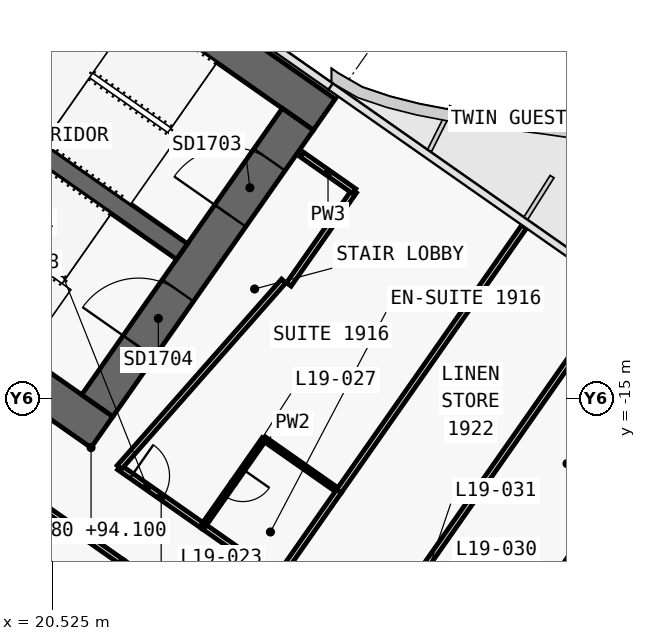
"""IFC4 building model, lengths in metres.
Left out: names, types, materials, properties, quantities, classifications, styles, units other than length and angle.
Written with IfcOpenShell. Run it as: python <this file> out.ifc"""

import sys

from ifc_helpers import new_model, si_unit, direction, frame, frame_2d, origin, place, context, subcontext, project, spatial, polyline, rectangle, outline, extrude, element, fill, save


model = new_model("IFC4")
c1 = context("Model", 3, precision=1e-05, world=origin(), true_north=direction((0.0, 1.0)))
c2 = subcontext(c1, "Body", "Model", "MODEL_VIEW")
j1 = project(units=[si_unit("LENGTHUNIT", "METRE"), si_unit("PLANEANGLEUNIT", "RADIAN")], contexts=[c1])
p1 = place(None, origin())
s1 = spatial("IfcSite", under=j1, at=p1, CompositionType="ELEMENT")
p2 = place(p1, origin())
s2 = spatial("IfcBuilding", under=s1, at=p2, CompositionType="ELEMENT")
p3 = place(p2, frame((0.0, 0.0, 94.1)))
s3 = spatial("IfcBuildingStorey", under=s2, at=p3, CompositionType="ELEMENT", Elevation=94.1)
p4 = place(p3, frame((-0.037, 11.867, 0.0), z_axis=(0.0, 0.0, 1.0), x_axis=(0.819155306259, -0.573571777746, 0.0)))
e1 = element("IfcWall", 1, at=p4, inside=s3, PredefinedType="SHEAR", context=c2, shape_type="SweptSolid", body=[
    extrude(outline(polyline([(33.837, 0.5), (0.0, 0.5), (0.7, -0.5), (33.837, -0.5), (33.837, 0.5)])), origin(), (0.0, 0.0, 1.0), 3.6),
])
p5 = place(p3, frame((-0.037, -0.585, 0.0), z_axis=(0.0, 0.0, 1.0), x_axis=(0.819157152511, -0.573569140985, 0.0)))
e2 = element("IfcWall", 2, at=p5, inside=s3, PredefinedType="SHEAR", context=c2, shape_type="SweptSolid", body=[
    extrude(outline(polyline([(26.695, 0.5), (0.0, 0.5), (0.7, -0.5), (26.695, -0.5), (26.695, 0.5)])), origin(), (0.0, 0.0, 1.0), 3.6),
])
p6 = place(p5, frame((6.695, 0.0, 0.0)))
e3 = element("IfcOpeningElement", 3, at=p6, cuts=e2, PredefinedType="OPENING", context=c2, shape_type="SweptSolid", body=[
    extrude(rectangle(XDim=1.5, YDim=2.1, at=frame_2d((0.75, 1.05))), frame((0.0, 0.51, 0.0), z_axis=(0.0, -1.0, 0.0), x_axis=(1.0, 0.0, 0.0)), (0.0, 0.0, 1.0), 1.02),
])
p7 = place(p5, frame((12.445, 0.0, 0.0)))
e4 = element("IfcOpeningElement", 4, at=p7, cuts=e2, PredefinedType="OPENING", context=c2, shape_type="SweptSolid", body=[
    extrude(rectangle(XDim=1.5, YDim=2.1, at=frame_2d((0.75, 1.05))), frame((0.0, 0.51, 0.0), z_axis=(0.0, -1.0, 0.0), x_axis=(1.0, 0.0, 0.0)), (0.0, 0.0, 1.0), 1.02),
])
p8 = place(p3, frame((21.708, -15.2, 0.0), z_axis=(0.0, 0.0, 1.0), x_axis=(0.573576324356, 0.819152122709, 0.0)))
e5 = element("IfcWall", 5, at=p8, inside=s3, PredefinedType="SHEAR", context=c2, shape_type="SweptSolid", body=[
    extrude(outline(polyline([(9.2, 0.5), (0.0, 0.5), (0.0, -0.5), (9.2, -0.5), (9.2, 0.5)])), origin(), (0.0, 0.0, 1.0), 3.6),
])
p9 = place(p8, frame((6.1, 0.0, 0.0)))
e6 = element("IfcOpeningElement", 6, at=p9, cuts=e5, PredefinedType="OPENING", context=c2, shape_type="SweptSolid", body=[
    extrude(rectangle(XDim=1.8, YDim=2.1, at=frame_2d((0.9, 1.05))), frame((0.0, 0.51, 0.0), z_axis=(0.0, -1.0, 0.0), x_axis=(1.0, 0.0, 0.0)), (0.0, 0.0, 1.0), 1.02),
])
p10 = place(p8, frame((1.9, 0.0, 0.0)))
e7 = element("IfcOpeningElement", 7, at=p10, cuts=e5, PredefinedType="OPENING", context=c2, shape_type="SweptSolid", body=[
    extrude(rectangle(XDim=1.8, YDim=2.1, at=frame_2d((0.9, 1.05))), frame((0.0, 0.51, 0.0), z_axis=(0.0, -1.0, 0.0), x_axis=(1.0, 0.0, 0.0)), (0.0, 0.0, 1.0), 1.02),
])
p11 = place(p3, frame((2.638, 3.768, 0.0), z_axis=(0.0, 0.0, 1.0), x_axis=(0.819148977158, -0.573580816643, 0.0)))
e8 = element("IfcWall", 8, at=p11, inside=s3, PredefinedType="SHEAR", context=c2, shape_type="SweptSolid", body=[
    extrude(outline(polyline([(0.0, 0.25), (0.0, -0.25), (26.0, -0.25), (26.0, 0.25), (0.0, 0.25)])), origin(), (0.0, 0.0, 1.0), 3.6),
])
p12 = place(p11, frame((9.637, 0.0, 0.0)))
e9 = element("IfcOpeningElement", 9, at=p12, cuts=e8, PredefinedType="OPENING", context=c2, shape_type="SweptSolid", body=[
    extrude(rectangle(XDim=1.2, YDim=2.1, at=frame_2d((0.6, 1.05))), frame((0.0, 0.26, 0.0), z_axis=(0.0, -1.0, 0.0), x_axis=(1.0, 0.0, 0.0)), (0.0, 0.0, 1.0), 0.52),
])
p13 = place(p11, frame((11.812, 0.0, 0.0)))
e10 = element("IfcOpeningElement", 10, at=p13, cuts=e8, PredefinedType="OPENING", context=c2, shape_type="SweptSolid", body=[
    extrude(rectangle(XDim=1.2, YDim=2.1, at=frame_2d((0.6, 1.05))), frame((0.0, 0.26, 0.0), z_axis=(0.0, -1.0, 0.0), x_axis=(1.0, 0.0, 0.0)), (0.0, 0.0, 1.0), 0.52),
])
p14 = place(p11, frame((13.988, 0.0, 0.0)))
e11 = element("IfcOpeningElement", 11, at=p14, cuts=e8, PredefinedType="OPENING", context=c2, shape_type="SweptSolid", body=[
    extrude(rectangle(XDim=1.2, YDim=2.1, at=frame_2d((0.6, 1.05))), frame((0.0, 0.26, 0.0), z_axis=(0.0, -1.0, 0.0), x_axis=(1.0, 0.0, 0.0)), (0.0, 0.0, 1.0), 0.52),
])
p15 = place(p11, frame((16.262, 0.0, 0.0)))
e12 = element("IfcOpeningElement", 12, at=p15, cuts=e8, PredefinedType="OPENING", context=c2, shape_type="SweptSolid", body=[
    extrude(rectangle(XDim=1.0, YDim=2.1, at=frame_2d((0.5, 1.05))), frame((0.0, 0.26, 0.0), z_axis=(0.0, -1.0, 0.0), x_axis=(1.0, 0.0, 0.0)), (0.0, 0.0, 1.0), 0.52),
])
p16 = place(p3, frame((22.284, -16.824, 0.0), z_axis=(0.0, 0.0, 1.0), x_axis=(0.819176640776, -0.573541307325, 0.0)))
e13 = element("IfcWall", 13, at=p16, inside=s3, PredefinedType="PARTITIONING", context=c2, shape_type="SweptSolid", body=[
    extrude(rectangle(XDim=2.698, YDim=0.15, at=frame_2d((1.349, 0.0))), origin(), (0.0, 0.0, 1.0), 3.32),
])
p17 = place(p16, frame((0.396, 0.0, 0.0)))
e14 = element("IfcOpeningElement", 14, at=p17, cuts=e13, PredefinedType="OPENING", context=c2, shape_type="SweptSolid", body=[
    extrude(rectangle(XDim=1.0, YDim=2.1, at=frame_2d((0.5, 1.05))), frame((0.0, 0.085, 0.0), z_axis=(0.0, -1.0, 0.0), x_axis=(1.0, 0.0, 0.0)), (0.0, 0.0, 1.0), 0.17),
])
p18 = place(p3, frame((24.491, -18.369, 0.0), z_axis=(0.0, 0.0, 1.0), x_axis=(0.819179439794, -0.573537309527, 0.0)))
e15 = element("IfcWall", 15, at=p18, inside=s3, PredefinedType="PARTITIONING", context=c2, shape_type="SweptSolid", body=[
    extrude(rectangle(XDim=2.404, YDim=0.15, at=frame_2d((1.202, 0.0))), origin(), (0.0, 0.0, 1.0), 3.32),
])
p19 = place(p3, frame((25.313, -21.387, 0.0), z_axis=(0.0, 0.0, 1.0), x_axis=(-0.819145961204, 0.573585123798, 0.0)))
e16 = element("IfcWall", 16, at=p19, inside=s3, PredefinedType="PARTITIONING", context=c2, shape_type="SweptSolid", body=[
    extrude(rectangle(XDim=3.603, YDim=0.15, at=frame_2d((1.802, 0.0))), origin(), (0.0, 0.0, 1.0), 3.32),
])
p20 = place(p19, frame((1.302, 0.0, 0.0)))
e17 = element("IfcOpeningElement", 17, at=p20, cuts=e16, PredefinedType="OPENING", context=c2, shape_type="SweptSolid", body=[
    extrude(rectangle(XDim=1.0, YDim=2.1, at=frame_2d((0.5, 1.05))), frame((0.0, 0.085, 0.0), z_axis=(0.0, -1.0, 0.0), x_axis=(1.0, 0.0, 0.0)), (0.0, 0.0, 1.0), 0.17),
])
p21 = place(p3, frame((22.364, -19.322, 0.0), z_axis=(0.0, 0.0, 1.0), x_axis=(-0.819146032251, 0.573585022335, 0.0)))
e18 = element("IfcWall", 18, at=p21, inside=s3, PredefinedType="PARTITIONING", context=c2, shape_type="SweptSolid", body=[
    extrude(rectangle(XDim=2.404, YDim=0.15, at=frame_2d((1.202, 0.0))), origin(), (0.0, 0.0, 1.0), 2.6),
])
p22 = place(p3, frame((26.098, -16.076, 0.0), z_axis=(0.0, 0.0, 1.0), x_axis=(-0.573550118428, -0.819170471667, 0.0)))
e19 = element("IfcWall", 19, at=p22, inside=s3, PredefinedType="PARTITIONING", context=c2, shape_type="SweptSolid", body=[
    extrude(rectangle(XDim=2.8, YDim=0.12, at=frame_2d((1.4, 0.0))), origin(), (0.0, 0.0, 1.0), 2.6),
])
p23 = place(p22, frame((0.975, 0.0, 0.0)))
e20 = element("IfcOpeningElement", 20, at=p23, cuts=e19, PredefinedType="OPENING", context=c2, shape_type="SweptSolid", body=[
    extrude(rectangle(XDim=0.85, YDim=2.05, at=frame_2d((0.425, 1.025))), frame((0.0, 0.07, 0.0), z_axis=(0.0, -1.0, 0.0), x_axis=(1.0, 0.0, 0.0)), (0.0, 0.0, 1.0), 0.14),
])
p24 = place(p3, frame((28.065, -17.453, 0.0), z_axis=(0.0, 0.0, 1.0), x_axis=(-0.819155442668, 0.573571582932, 0.0)))
e21 = element("IfcWall", 21, at=p24, inside=s3, PredefinedType="PARTITIONING", context=c2, shape_type="SweptSolid", body=[
    extrude(rectangle(XDim=2.4, YDim=0.12, at=frame_2d((1.2, 0.0))), origin(), (0.0, 0.0, 1.0), 3.32),
])
p25 = place(p3, frame((32.94, -10.491, 0.0), z_axis=(0.0, 0.0, 1.0), x_axis=(-0.573593433868, -0.819140142237, 0.0)))
e22 = element("IfcWall", 22, at=p25, inside=s3, PredefinedType="PARTITIONING", context=c2, shape_type="SweptSolid", body=[
    extrude(rectangle(XDim=8.499, YDim=0.15, at=frame_2d((4.25, 0.0))), origin(), (0.0, 0.0, 1.0), 2.6),
])
p26 = place(p3, frame((22.285, -16.825, 0.0), z_axis=(0.0, 0.0, 1.0), x_axis=(0.661551268245, 0.749899939647, 0.0)))
e23 = element("IfcWall", 23, at=p26, inside=s3, PredefinedType="PARTITIONING", context=c2, shape_type="SweptSolid", body=[
    extrude(rectangle(XDim=6.541, YDim=0.15, at=frame_2d((3.271, 0.0))), origin(), (0.0, 0.0, 1.0), 2.6),
])
p27 = place(p3, frame((26.746, -12.014, 0.0), z_axis=(0.0, 0.0, 1.0), x_axis=(0.573560650686, 0.819163097304, 0.0)))
e24 = element("IfcWall", 24, at=p27, inside=s3, PredefinedType="PARTITIONING", context=c2, shape_type="SweptSolid", body=[
    extrude(rectangle(XDim=3.0, YDim=0.15, at=frame_2d((1.5, 0.0))), origin(), (0.0, 0.0, 1.0), 3.32),
])
p28 = place(p3, frame((28.467, -9.556, 0.0), z_axis=(0.0, 0.0, 1.0), x_axis=(-0.819109000826, 0.573637903879, 0.0)))
e25 = element("IfcWall", 25, at=p28, inside=s3, PredefinedType="PARTITIONING", context=c2, shape_type="SweptSolid", body=[
    extrude(rectangle(XDim=1.68, YDim=0.15, at=frame_2d((0.84, 0.0))), origin(), (0.0, 0.0, 1.0), 3.32),
])
p29 = place(p3, frame((28.064, -17.454, 0.0), z_axis=(0.0, 0.0, 1.0), x_axis=(-0.573550118428, -0.819170471667, 0.0)))
e26 = element("IfcWall", 26, at=p29, inside=s3, PredefinedType="PARTITIONING", context=c2, shape_type="SweptSolid", body=[
    extrude(rectangle(XDim=2.8, YDim=0.15, at=frame_2d((1.4, 0.0))), origin(), (0.0, 0.0, 1.0), 2.6),
])
p30 = place(p3, frame((35.013, -12.76, 0.0), z_axis=(0.0, 0.0, 1.0), x_axis=(-0.573558725113, -0.819164445546, 0.0)))
e27 = element("IfcWall", 27, at=p30, inside=s3, PredefinedType="PARTITIONING", context=c2, shape_type="SweptSolid", body=[
    extrude(rectangle(XDim=9.01, YDim=0.15, at=frame_2d((4.505, 0.0))), origin(), (0.0, 0.0, 1.0), 2.6),
])
p31 = place(p3, frame((37.855, -13.932, 0.0), z_axis=(0.0, 0.0, 1.0), x_axis=(-0.573576058406, -0.819152308929, 0.0)))
e28 = element("IfcWall", 28, at=p31, inside=s3, PredefinedType="PARTITIONING", context=c2, shape_type="SweptSolid", body=[
    extrude(rectangle(XDim=8.501, YDim=0.15, at=frame_2d((4.25, 0.0))), origin(), (0.0, 0.0, 1.0), 2.5),
])
p32 = place(p9, origin())
e29 = element("IfcDoor", 29, at=p32, inside=s3, OperationType="DOUBLE_DOOR_SINGLE_SWING", PredefinedType="DOOR", context=c2, shape_type="SweptSolid", body=[
    extrude(rectangle(XDim=1.8, YDim=2.1, at=frame_2d((0.9, 1.05))), frame((0.0, 0.025, 0.0), z_axis=(0.0, -1.0, 0.0), x_axis=(1.0, 0.0, 0.0)), (0.0, 0.0, 1.0), 0.05),
])
fill(e6, e29)
p33 = place(p10, origin())
e30 = element("IfcDoor", 30, at=p33, inside=s3, OperationType="DOUBLE_DOOR_SINGLE_SWING", PredefinedType="DOOR", context=c2, shape_type="SweptSolid", body=[
    extrude(rectangle(XDim=1.8, YDim=2.1, at=frame_2d((0.9, 1.05))), frame((0.0, 0.025, 0.0), z_axis=(0.0, -1.0, 0.0), x_axis=(1.0, 0.0, 0.0)), (0.0, 0.0, 1.0), 0.05),
])
fill(e7, e30)
p34 = place(p23, origin())
e31 = element("IfcDoor", 31, at=p34, inside=s3, OperationType="SINGLE_SWING_LEFT", PredefinedType="DOOR", context=c2, shape_type="SweptSolid", body=[
    extrude(rectangle(XDim=0.85, YDim=2.05, at=frame_2d((0.425, 1.025))), frame((0.0, 0.025, 0.0), z_axis=(0.0, -1.0, 0.0), x_axis=(1.0, 0.0, 0.0)), (0.0, 0.0, 1.0), 0.05),
])
fill(e20, e31)
p35 = place(p17, origin())
e32 = element("IfcDoor", 32, at=p35, inside=s3, OperationType="SINGLE_SWING_RIGHT", PredefinedType="DOOR", context=c2, shape_type="SweptSolid", body=[
    extrude(rectangle(XDim=1.0, YDim=2.1, at=frame_2d((0.5, 1.05))), frame((0.0, 0.025, 0.0), z_axis=(0.0, -1.0, 0.0), x_axis=(1.0, 0.0, 0.0)), (0.0, 0.0, 1.0), 0.05),
])
fill(e14, e32)
save(model, sys.argv[1])
